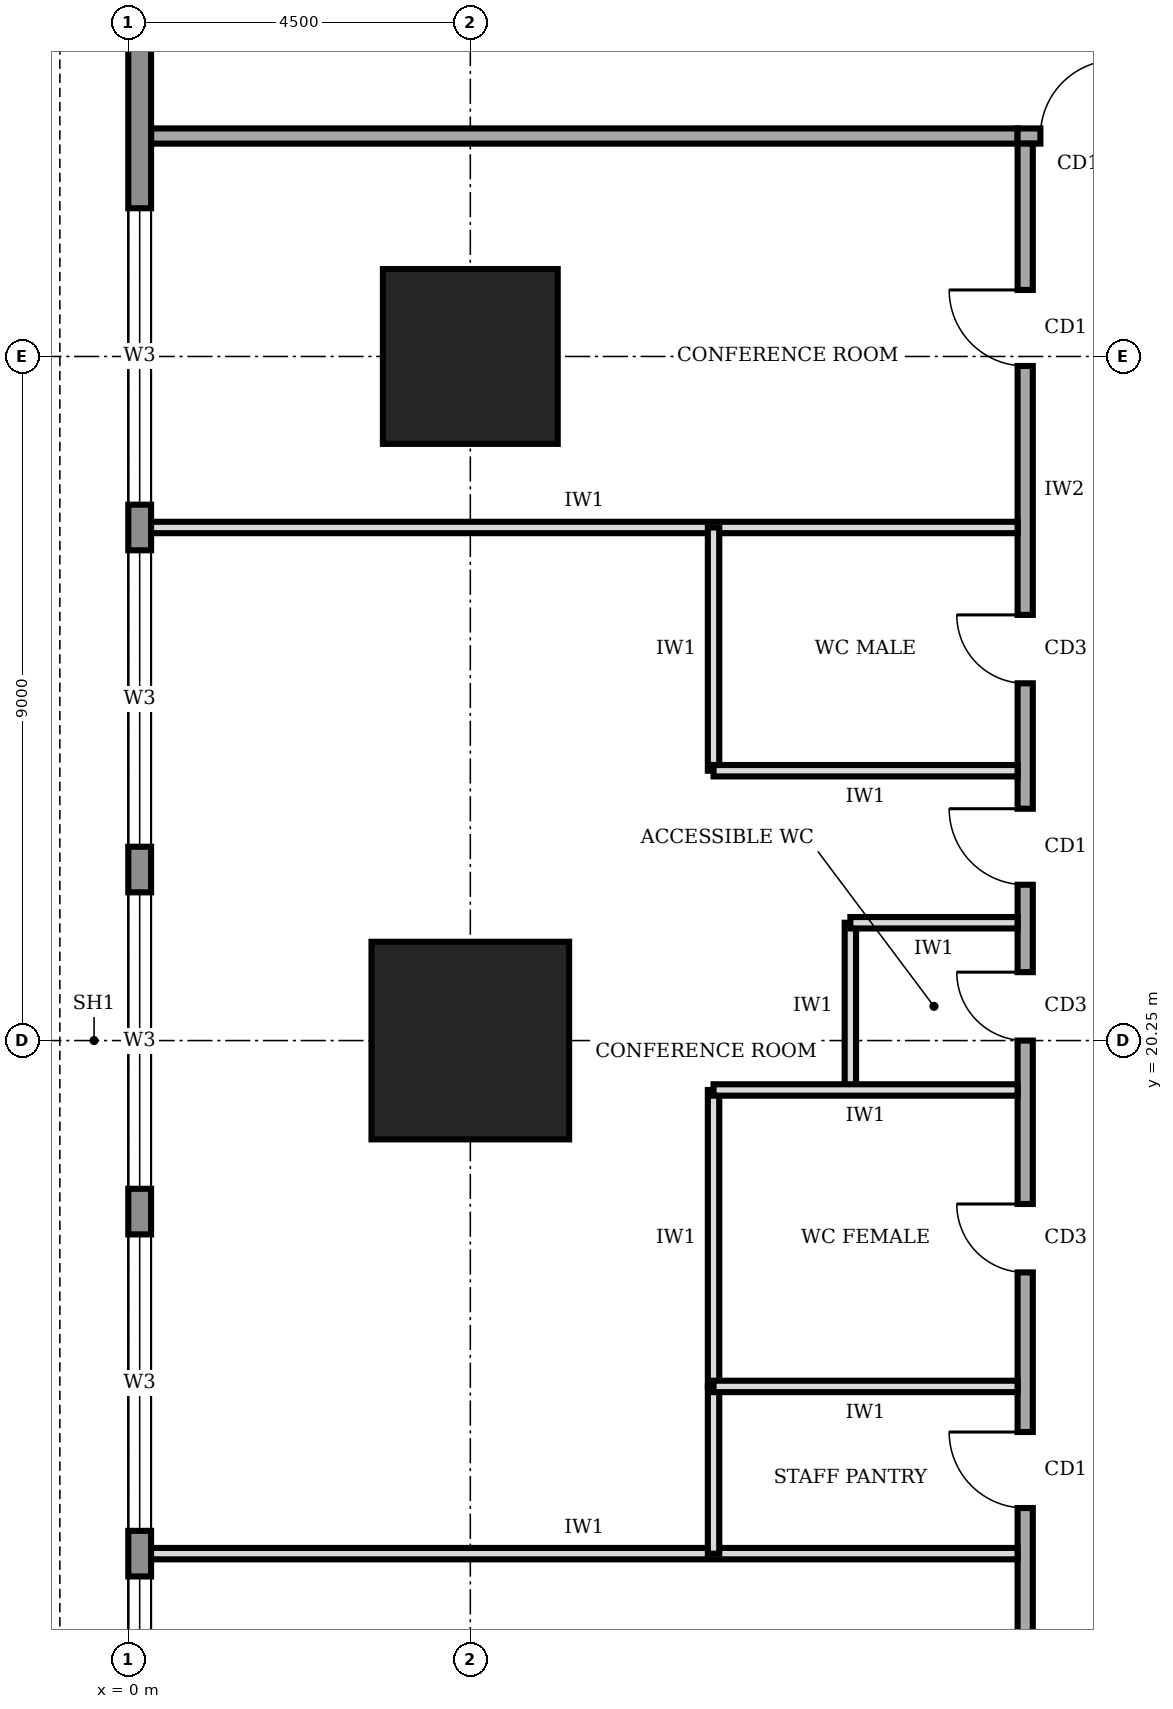
"""IFC4 building model, lengths in metres.
Left out: names, types, materials, properties, quantities, classifications, styles, units other than length and angle.
Written with IfcOpenShell. Run it as: python <this file> out.ifc"""

import sys

from ifc_helpers import new_model, si_unit, direction, frame, frame_2d, origin, origin_2d, place, context, subcontext, project, spatial, rectangle, extrude, element, fill, save


model = new_model("IFC4")
c1 = context("Model", 3, precision=1e-05, world=origin(), true_north=direction((0.0, 1.0)))
c2 = subcontext(c1, "Body", "Model", "MODEL_VIEW")
j1 = project(units=[si_unit("LENGTHUNIT", "METRE"), si_unit("PLANEANGLEUNIT", "RADIAN")], contexts=[c1])
p1 = place(None, origin())
s1 = spatial("IfcSite", under=j1, at=p1, CompositionType="ELEMENT")
p2 = place(p1, origin())
s2 = spatial("IfcBuilding", under=s1, at=p2, CompositionType="ELEMENT")
p3 = place(p2, frame((0.0, 0.0, 97.0)))
s3 = spatial("IfcBuildingStorey", under=s2, at=p3, CompositionType="ELEMENT", Elevation=97.0)
p4 = place(p3, frame((4.5, 20.25, 0.0), z_axis=(0.0, 0.0, 1.0), x_axis=(1.0, 0.0, 0.0)))
e1 = element("IfcColumn", 1, at=p4, inside=s3, PredefinedType="COLUMN", context=c2, shape_type="SweptSolid", body=[
    extrude(rectangle(XDim=2.6, YDim=2.6, at=origin_2d()), origin(), (0.0, 0.0, 1.0), 4.0),
])
p5 = place(p3, frame((4.5, 29.25, 0.0), z_axis=(0.0, 0.0, 1.0), x_axis=(1.0, 0.0, 0.0)))
e2 = element("IfcColumn", 2, at=p5, inside=s3, PredefinedType="COLUMN", context=c2, shape_type="SweptSolid", body=[
    extrude(rectangle(XDim=2.3, YDim=2.3, at=origin_2d()), origin(), (0.0, 0.0, 1.0), 4.0),
])
p6 = place(p3, frame((0.15, 35.98, 0.0), z_axis=(0.0, 0.0, 1.0), x_axis=(0.0, -1.0, 0.0)))
e3 = element("IfcWall", 3, at=p6, inside=s3, PredefinedType="STANDARD", context=c2, shape_type="SweptSolid", body=[
    extrude(rectangle(XDim=31.46, YDim=0.3, at=frame_2d((15.73, 0.0))), origin(), (0.0, 0.0, 1.0), 3.75),
])
p7 = place(p6, frame((27.28, 0.0, 0.95)))
e4 = element("IfcOpeningElement", 4, at=p7, cuts=e3, PredefinedType="OPENING", context=c2, shape_type="SweptSolid", body=[
    extrude(rectangle(XDim=3.9, YDim=1.8, at=frame_2d((1.95, 0.9))), frame((0.0, 0.16, 0.0), z_axis=(0.0, -1.0, 0.0), x_axis=(1.0, 0.0, 0.0)), (0.0, 0.0, 1.0), 0.32),
])
p8 = place(p6, frame((22.78, 0.0, 0.95)))
e5 = element("IfcOpeningElement", 5, at=p8, cuts=e3, PredefinedType="OPENING", context=c2, shape_type="SweptSolid", body=[
    extrude(rectangle(XDim=3.9, YDim=1.8, at=frame_2d((1.95, 0.9))), frame((0.0, 0.16, 0.0), z_axis=(0.0, -1.0, 0.0), x_axis=(1.0, 0.0, 0.0)), (0.0, 0.0, 1.0), 0.32),
])
p9 = place(p6, frame((18.28, 0.0, 0.95)))
e6 = element("IfcOpeningElement", 6, at=p9, cuts=e3, PredefinedType="OPENING", context=c2, shape_type="SweptSolid", body=[
    extrude(rectangle(XDim=3.9, YDim=1.8, at=frame_2d((1.95, 0.9))), frame((0.0, 0.16, 0.0), z_axis=(0.0, -1.0, 0.0), x_axis=(1.0, 0.0, 0.0)), (0.0, 0.0, 1.0), 0.32),
])
p10 = place(p6, frame((13.78, 0.0, 0.95)))
e7 = element("IfcOpeningElement", 7, at=p10, cuts=e3, PredefinedType="OPENING", context=c2, shape_type="SweptSolid", body=[
    extrude(rectangle(XDim=3.9, YDim=1.8, at=frame_2d((1.95, 0.9))), frame((0.0, 0.16, 0.0), z_axis=(0.0, -1.0, 0.0), x_axis=(1.0, 0.0, 0.0)), (0.0, 0.0, 1.0), 0.32),
])
p11 = place(p6, frame((9.28, 0.0, 0.95)))
e8 = element("IfcOpeningElement", 8, at=p11, cuts=e3, PredefinedType="OPENING", context=c2, shape_type="SweptSolid", body=[
    extrude(rectangle(XDim=3.9, YDim=1.8, at=frame_2d((1.95, 0.9))), frame((0.0, 0.16, 0.0), z_axis=(0.0, -1.0, 0.0), x_axis=(1.0, 0.0, 0.0)), (0.0, 0.0, 1.0), 0.32),
])
p12 = place(p6, frame((4.78, 0.0, 0.95)))
e9 = element("IfcOpeningElement", 9, at=p12, cuts=e3, PredefinedType="OPENING", context=c2, shape_type="SweptSolid", body=[
    extrude(rectangle(XDim=3.9, YDim=1.8, at=frame_2d((1.95, 0.9))), frame((0.0, 0.16, 0.0), z_axis=(0.0, -1.0, 0.0), x_axis=(1.0, 0.0, 0.0)), (0.0, 0.0, 1.0), 0.32),
])
p13 = place(p3, frame((40.2, 32.15, 0.0), z_axis=(0.0, 0.0, 1.0), x_axis=(-1.0, 0.0, 0.0)))
e10 = element("IfcWall", 10, at=p13, inside=s3, PredefinedType="SOLIDWALL", context=c2, shape_type="SweptSolid", body=[
    extrude(rectangle(XDim=28.5, YDim=0.2, at=frame_2d((14.25, 0.0))), origin(), (0.0, 0.0, 1.0), 3.75),
])
p14 = place(p13, frame((27.2, 0.0, 0.0)))
e11 = element("IfcOpeningElement", 11, at=p14, cuts=e10, PredefinedType="OPENING", context=c2, shape_type="SweptSolid", body=[
    extrude(rectangle(XDim=1.0, YDim=2.1, at=frame_2d((0.5, 1.05))), frame((0.0, 0.11, 0.0), z_axis=(0.0, -1.0, 0.0), x_axis=(1.0, 0.0, 0.0)), (0.0, 0.0, 1.0), 0.22),
])
p15 = place(p13, frame((23.95, 0.0, 0.0)))
e12 = element("IfcOpeningElement", 12, at=p15, cuts=e10, PredefinedType="OPENING", context=c2, shape_type="SweptSolid", body=[
    extrude(rectangle(XDim=1.0, YDim=2.1, at=frame_2d((0.5, 1.05))), frame((0.0, 0.11, 0.0), z_axis=(0.0, -1.0, 0.0), x_axis=(1.0, 0.0, 0.0)), (0.0, 0.0, 1.0), 0.22),
])
p16 = place(p13, frame((17.2, 0.0, 0.0)))
e13 = element("IfcOpeningElement", 13, at=p16, cuts=e10, PredefinedType="OPENING", context=c2, shape_type="SweptSolid", body=[
    extrude(rectangle(XDim=1.0, YDim=2.1, at=frame_2d((0.5, 1.05))), frame((0.0, 0.11, 0.0), z_axis=(0.0, -1.0, 0.0), x_axis=(1.0, 0.0, 0.0)), (0.0, 0.0, 1.0), 0.22),
])
p17 = place(p13, frame((6.0, 0.0, 0.0)))
e14 = element("IfcOpeningElement", 14, at=p17, cuts=e10, PredefinedType="OPENING", context=c2, shape_type="SweptSolid", body=[
    extrude(rectangle(XDim=1.0, YDim=2.1, at=frame_2d((0.5, 1.05))), frame((0.0, 0.11, 0.0), z_axis=(0.0, -1.0, 0.0), x_axis=(1.0, 0.0, 0.0)), (0.0, 0.0, 1.0), 0.22),
])
p18 = place(p3, frame((11.8, 32.05, 0.0), z_axis=(0.0, 0.0, 1.0), x_axis=(0.0, -1.0, 0.0)))
e15 = element("IfcWall", 15, at=p18, inside=s3, PredefinedType="SOLIDWALL", context=c2, shape_type="SweptSolid", body=[
    extrude(rectangle(XDim=23.8, YDim=0.2, at=frame_2d((11.9, 0.0))), origin(), (0.0, 0.0, 1.0), 3.75),
])
p19 = place(p18, frame((20.675, 0.0, 0.0)))
e16 = element("IfcOpeningElement", 16, at=p19, cuts=e15, PredefinedType="OPENING", context=c2, shape_type="SweptSolid", body=[
    extrude(rectangle(XDim=1.0, YDim=2.1, at=frame_2d((0.5, 1.05))), frame((0.0, 0.11, 0.0), z_axis=(0.0, -1.0, 0.0), x_axis=(1.0, 0.0, 0.0)), (0.0, 0.0, 1.0), 0.22),
])
p20 = place(p18, frame((16.95, 0.0, 0.0)))
e17 = element("IfcOpeningElement", 17, at=p20, cuts=e15, PredefinedType="OPENING", context=c2, shape_type="SweptSolid", body=[
    extrude(rectangle(XDim=1.0, YDim=2.1, at=frame_2d((0.5, 1.05))), frame((0.0, 0.11, 0.0), z_axis=(0.0, -1.0, 0.0), x_axis=(1.0, 0.0, 0.0)), (0.0, 0.0, 1.0), 0.22),
])
p21 = place(p18, frame((13.95, 0.0, 0.0)))
e18 = element("IfcOpeningElement", 18, at=p21, cuts=e15, PredefinedType="OPENING", context=c2, shape_type="SweptSolid", body=[
    extrude(rectangle(XDim=0.9, YDim=2.1, at=frame_2d((0.45, 1.05))), frame((0.0, 0.11, 0.0), z_axis=(0.0, -1.0, 0.0), x_axis=(1.0, 0.0, 0.0)), (0.0, 0.0, 1.0), 0.22),
])
p22 = place(p18, frame((10.9, 0.0, 0.0)))
e19 = element("IfcOpeningElement", 19, at=p22, cuts=e15, PredefinedType="OPENING", context=c2, shape_type="SweptSolid", body=[
    extrude(rectangle(XDim=0.9, YDim=2.1, at=frame_2d((0.45, 1.05))), frame((0.0, 0.11, 0.0), z_axis=(0.0, -1.0, 0.0), x_axis=(1.0, 0.0, 0.0)), (0.0, 0.0, 1.0), 0.22),
])
p23 = place(p18, frame((6.2, 0.0, 0.0)))
e20 = element("IfcOpeningElement", 20, at=p23, cuts=e15, PredefinedType="OPENING", context=c2, shape_type="SweptSolid", body=[
    extrude(rectangle(XDim=0.9, YDim=2.1, at=frame_2d((0.45, 1.05))), frame((0.0, 0.11, 0.0), z_axis=(0.0, -1.0, 0.0), x_axis=(1.0, 0.0, 0.0)), (0.0, 0.0, 1.0), 0.22),
])
p24 = place(p18, frame((8.75, 0.0, 0.0)))
e21 = element("IfcOpeningElement", 21, at=p24, cuts=e15, PredefinedType="OPENING", context=c2, shape_type="SweptSolid", body=[
    extrude(rectangle(XDim=1.0, YDim=2.1, at=frame_2d((0.5, 1.05))), frame((0.0, 0.11, 0.0), z_axis=(0.0, -1.0, 0.0), x_axis=(1.0, 0.0, 0.0)), (0.0, 0.0, 1.0), 0.22),
])
p25 = place(p18, frame((1.925, 0.0, 0.0)))
e22 = element("IfcOpeningElement", 22, at=p25, cuts=e15, PredefinedType="OPENING", context=c2, shape_type="SweptSolid", body=[
    extrude(rectangle(XDim=1.0, YDim=2.1, at=frame_2d((0.5, 1.05))), frame((0.0, 0.11, 0.0), z_axis=(0.0, -1.0, 0.0), x_axis=(1.0, 0.0, 0.0)), (0.0, 0.0, 1.0), 0.22),
])
p26 = place(p3, frame((0.3, 32.15, 0.0), z_axis=(0.0, 0.0, 1.0), x_axis=(1.0, 0.0, 0.0)))
e23 = element("IfcWall", 23, at=p26, inside=s3, PredefinedType="SOLIDWALL", context=c2, shape_type="SweptSolid", body=[
    extrude(rectangle(XDim=11.4, YDim=0.2, at=frame_2d((5.7, 0.0))), origin(), (0.0, 0.0, 1.0), 3.75),
])
for number, where, z_axis, x_axis in (
    (24, (0.3, 13.5, 0.0), (0.0, 0.0, 1.0), (1.0, 0.0, 0.0)),
    (25, (0.3, 27.0, 0.0), (0.0, 0.0, 1.0), (1.0, 0.0, 0.0)),
):
    element("IfcWall", number, at=place(p3, frame(where, z_axis=z_axis, x_axis=x_axis)), inside=s3, PredefinedType="PARTITIONING", context=c2, shape_type="SweptSolid", body=[
        extrude(rectangle(XDim=11.4, YDim=0.15, at=frame_2d((5.7, 0.0))), origin(), (0.0, 0.0, 1.0), 3.75),
    ])
p27 = place(p3, frame((11.7, 15.7, 0.0), z_axis=(0.0, 0.0, 1.0), x_axis=(-1.0, 0.0, 0.0)))
e26 = element("IfcWall", 26, at=p27, inside=s3, PredefinedType="PARTITIONING", context=c2, shape_type="SweptSolid", body=[
    extrude(rectangle(XDim=4.0, YDim=0.15, at=frame_2d((2.0, 0.0))), origin(), (0.0, 0.0, 1.0), 3.75),
])
p28 = place(p3, frame((11.7, 19.6, 0.0), z_axis=(0.0, 0.0, 1.0), x_axis=(-1.0, 0.0, 0.0)))
e27 = element("IfcWall", 27, at=p28, inside=s3, PredefinedType="PARTITIONING", context=c2, shape_type="SweptSolid", body=[
    extrude(rectangle(XDim=4.0, YDim=0.15, at=frame_2d((2.0, 0.0))), origin(), (0.0, 0.0, 1.0), 2.85),
])
p29 = place(p3, frame((11.7, 21.8, 0.0), z_axis=(0.0, 0.0, 1.0), x_axis=(-1.0, 0.0, 0.0)))
e28 = element("IfcWall", 28, at=p29, inside=s3, PredefinedType="PARTITIONING", context=c2, shape_type="SweptSolid", body=[
    extrude(rectangle(XDim=2.2, YDim=0.15, at=frame_2d((1.1, 0.0))), origin(), (0.0, 0.0, 1.0), 3.75),
])
p30 = place(p3, frame((11.7, 23.8, 0.0), z_axis=(0.0, 0.0, 1.0), x_axis=(-1.0, 0.0, 0.0)))
e29 = element("IfcWall", 29, at=p30, inside=s3, PredefinedType="PARTITIONING", context=c2, shape_type="SweptSolid", body=[
    extrude(rectangle(XDim=4.0, YDim=0.15, at=frame_2d((2.0, 0.0))), origin(), (0.0, 0.0, 1.0), 3.75),
])
p31 = place(p3, frame((7.7, 13.5, 0.0), z_axis=(0.0, 0.0, 1.0), x_axis=(0.0, 1.0, 0.0)))
e30 = element("IfcWall", 30, at=p31, inside=s3, PredefinedType="PARTITIONING", context=c2, shape_type="SweptSolid", body=[
    extrude(rectangle(XDim=2.2, YDim=0.15, at=frame_2d((1.1, 0.0))), origin(), (0.0, 0.0, 1.0), 3.75),
])
p32 = place(p3, frame((7.7, 15.7, 0.0), z_axis=(0.0, 0.0, 1.0), x_axis=(0.0, 1.0, 0.0)))
e31 = element("IfcWall", 31, at=p32, inside=s3, PredefinedType="PARTITIONING", context=c2, shape_type="SweptSolid", body=[
    extrude(rectangle(XDim=3.9, YDim=0.15, at=frame_2d((1.95, 0.0))), origin(), (0.0, 0.0, 1.0), 3.75),
])
p33 = place(p3, frame((9.5, 19.6, 0.0), z_axis=(0.0, 0.0, 1.0), x_axis=(0.0, 1.0, 0.0)))
e32 = element("IfcWall", 32, at=p33, inside=s3, PredefinedType="PARTITIONING", context=c2, shape_type="SweptSolid", body=[
    extrude(rectangle(XDim=2.2, YDim=0.15, at=frame_2d((1.1, 0.0))), origin(), (0.0, 0.0, 1.0), 3.75),
])
p34 = place(p3, frame((7.7, 23.8, 0.0), z_axis=(0.0, 0.0, 1.0), x_axis=(0.0, 1.0, 0.0)))
e33 = element("IfcWall", 33, at=p34, inside=s3, PredefinedType="PARTITIONING", context=c2, shape_type="SweptSolid", body=[
    extrude(rectangle(XDim=3.2, YDim=0.15, at=frame_2d((1.6, 0.0))), origin(), (0.0, 0.0, 1.0), 3.75),
])
p35 = place(p8, origin())
e34 = element("IfcWindow", 34, at=p35, inside=s3, PartitioningType="SINGLE_PANEL", PredefinedType="WINDOW", context=c2, shape_type="SweptSolid", body=[
    extrude(rectangle(XDim=3.9, YDim=1.8, at=frame_2d((1.95, 0.9))), frame((0.0, 0.03, 0.0), z_axis=(0.0, -1.0, 0.0), x_axis=(1.0, 0.0, 0.0)), (0.0, 0.0, 1.0), 0.06),
])
fill(e5, e34)
p36 = place(p9, origin())
e35 = element("IfcWindow", 35, at=p36, inside=s3, PartitioningType="SINGLE_PANEL", PredefinedType="WINDOW", context=c2, shape_type="SweptSolid", body=[
    extrude(rectangle(XDim=3.9, YDim=1.8, at=frame_2d((1.95, 0.9))), frame((0.0, 0.03, 0.0), z_axis=(0.0, -1.0, 0.0), x_axis=(1.0, 0.0, 0.0)), (0.0, 0.0, 1.0), 0.06),
])
fill(e6, e35)
p37 = place(p10, origin())
e36 = element("IfcWindow", 36, at=p37, inside=s3, PartitioningType="SINGLE_PANEL", PredefinedType="WINDOW", context=c2, shape_type="SweptSolid", body=[
    extrude(rectangle(XDim=3.9, YDim=1.8, at=frame_2d((1.95, 0.9))), frame((0.0, 0.03, 0.0), z_axis=(0.0, -1.0, 0.0), x_axis=(1.0, 0.0, 0.0)), (0.0, 0.0, 1.0), 0.06),
])
fill(e7, e36)
p38 = place(p11, origin())
e37 = element("IfcWindow", 37, at=p38, inside=s3, PartitioningType="SINGLE_PANEL", PredefinedType="WINDOW", context=c2, shape_type="SweptSolid", body=[
    extrude(rectangle(XDim=3.9, YDim=1.8, at=frame_2d((1.95, 0.9))), frame((0.0, 0.03, 0.0), z_axis=(0.0, -1.0, 0.0), x_axis=(1.0, 0.0, 0.0)), (0.0, 0.0, 1.0), 0.06),
])
fill(e8, e37)
p39 = place(p12, origin())
e38 = element("IfcWindow", 38, at=p39, inside=s3, PartitioningType="SINGLE_PANEL", PredefinedType="WINDOW", context=c2, shape_type="SweptSolid", body=[
    extrude(rectangle(XDim=3.9, YDim=1.8, at=frame_2d((1.95, 0.9))), frame((0.0, 0.03, 0.0), z_axis=(0.0, -1.0, 0.0), x_axis=(1.0, 0.0, 0.0)), (0.0, 0.0, 1.0), 0.06),
])
fill(e9, e38)
p40 = place(p14, frame((1.0, 0.0, 0.0), z_axis=(0.0, 0.0, 1.0), x_axis=(-1.0, 0.0, 0.0)))
e39 = element("IfcDoor", 39, at=p40, inside=s3, OperationType="SINGLE_SWING_RIGHT", PredefinedType="DOOR", context=c2, shape_type="SweptSolid", body=[
    extrude(rectangle(XDim=1.0, YDim=2.1, at=frame_2d((0.5, 1.05))), frame((0.0, 0.025, 0.0), z_axis=(0.0, -1.0, 0.0), x_axis=(1.0, 0.0, 0.0)), (0.0, 0.0, 1.0), 0.05),
])
fill(e11, e39)
p41 = place(p20, frame((1.0, 0.0, 0.0), z_axis=(0.0, 0.0, 1.0), x_axis=(-1.0, 0.0, 0.0)))
e40 = element("IfcDoor", 40, at=p41, inside=s3, OperationType="SINGLE_SWING_RIGHT", PredefinedType="DOOR", context=c2, shape_type="SweptSolid", body=[
    extrude(rectangle(XDim=1.0, YDim=2.1, at=frame_2d((0.5, 1.05))), frame((0.0, 0.025, 0.0), z_axis=(0.0, -1.0, 0.0), x_axis=(1.0, 0.0, 0.0)), (0.0, 0.0, 1.0), 0.05),
])
fill(e17, e40)
p42 = place(p21, frame((0.9, 0.0, 0.0), z_axis=(0.0, 0.0, 1.0), x_axis=(-1.0, 0.0, 0.0)))
e41 = element("IfcDoor", 41, at=p42, inside=s3, OperationType="SINGLE_SWING_RIGHT", PredefinedType="DOOR", context=c2, shape_type="SweptSolid", body=[
    extrude(rectangle(XDim=0.9, YDim=2.1, at=frame_2d((0.45, 1.05))), frame((0.0, 0.025, 0.0), z_axis=(0.0, -1.0, 0.0), x_axis=(1.0, 0.0, 0.0)), (0.0, 0.0, 1.0), 0.05),
])
fill(e18, e41)
p43 = place(p22, frame((0.9, 0.0, 0.0), z_axis=(0.0, 0.0, 1.0), x_axis=(-1.0, 0.0, 0.0)))
e42 = element("IfcDoor", 42, at=p43, inside=s3, OperationType="SINGLE_SWING_RIGHT", PredefinedType="DOOR", context=c2, shape_type="SweptSolid", body=[
    extrude(rectangle(XDim=0.9, YDim=2.1, at=frame_2d((0.45, 1.05))), frame((0.0, 0.025, 0.0), z_axis=(0.0, -1.0, 0.0), x_axis=(1.0, 0.0, 0.0)), (0.0, 0.0, 1.0), 0.05),
])
fill(e19, e42)
p44 = place(p23, frame((0.9, 0.0, 0.0), z_axis=(0.0, 0.0, 1.0), x_axis=(-1.0, 0.0, 0.0)))
e43 = element("IfcDoor", 43, at=p44, inside=s3, OperationType="SINGLE_SWING_RIGHT", PredefinedType="DOOR", context=c2, shape_type="SweptSolid", body=[
    extrude(rectangle(XDim=0.9, YDim=2.1, at=frame_2d((0.45, 1.05))), frame((0.0, 0.025, 0.0), z_axis=(0.0, -1.0, 0.0), x_axis=(1.0, 0.0, 0.0)), (0.0, 0.0, 1.0), 0.05),
])
fill(e20, e43)
p45 = place(p24, frame((1.0, 0.0, 0.0), z_axis=(0.0, 0.0, 1.0), x_axis=(-1.0, 0.0, 0.0)))
e44 = element("IfcDoor", 44, at=p45, inside=s3, OperationType="SINGLE_SWING_RIGHT", PredefinedType="DOOR", context=c2, shape_type="SweptSolid", body=[
    extrude(rectangle(XDim=1.0, YDim=2.1, at=frame_2d((0.5, 1.05))), frame((0.0, 0.025, 0.0), z_axis=(0.0, -1.0, 0.0), x_axis=(1.0, 0.0, 0.0)), (0.0, 0.0, 1.0), 0.05),
])
fill(e21, e44)
p46 = place(p25, frame((1.0, 0.0, 0.0), z_axis=(0.0, 0.0, 1.0), x_axis=(-1.0, 0.0, 0.0)))
e45 = element("IfcDoor", 45, at=p46, inside=s3, OperationType="SINGLE_SWING_RIGHT", PredefinedType="DOOR", context=c2, shape_type="SweptSolid", body=[
    extrude(rectangle(XDim=1.0, YDim=2.1, at=frame_2d((0.5, 1.05))), frame((0.0, 0.025, 0.0), z_axis=(0.0, -1.0, 0.0), x_axis=(1.0, 0.0, 0.0)), (0.0, 0.0, 1.0), 0.05),
])
fill(e22, e45)
save(model, sys.argv[1])
